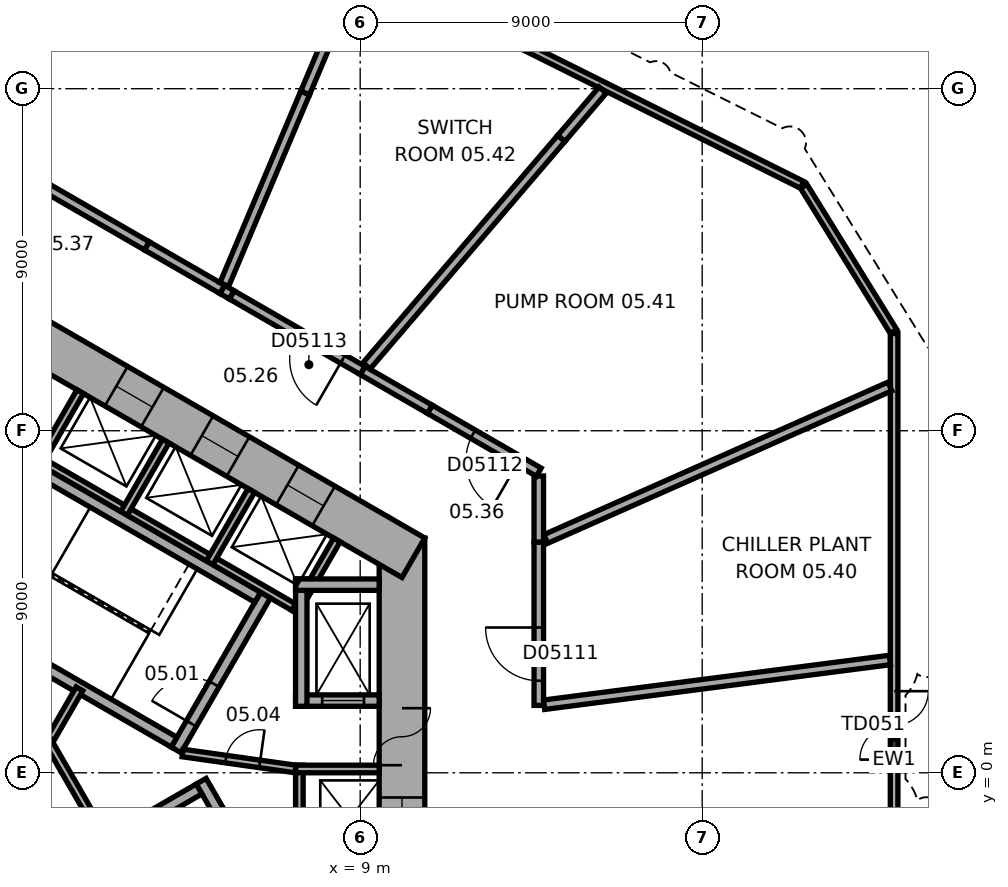
"""IFC4 building model, lengths in metres.
Left out: names, types, materials, properties, quantities, classifications, styles, units other than length and angle.
Written with IfcOpenShell. Run it as: python <this file> out.ifc"""

import sys

from ifc_helpers import new_model, si_unit, direction, frame, frame_2d, origin, place, context, subcontext, project, spatial, rectangle, extrude, element, fill, save


model = new_model("IFC4")
c1 = context("Model", 3, precision=1e-05, world=origin(), true_north=direction((0.0, 1.0)))
c2 = subcontext(c1, "Body", "Model", "MODEL_VIEW")
j1 = project(units=[si_unit("LENGTHUNIT", "METRE"), si_unit("PLANEANGLEUNIT", "RADIAN")], contexts=[c1])
p1 = place(None, origin())
s1 = spatial("IfcSite", under=j1, at=p1, CompositionType="ELEMENT")
p2 = place(p1, origin())
s2 = spatial("IfcBuilding", under=s1, at=p2, CompositionType="ELEMENT")
p3 = place(p2, frame((0.0, 0.0, 34.5)))
s3 = spatial("IfcBuildingStorey", under=s2, at=p3, CompositionType="ELEMENT", Elevation=34.5)
p4 = place(p3, frame((10.1, -6.177, 0.0), z_axis=(0.0, 0.0, 1.0), x_axis=(0.0, 1.0, 0.0)))
e1 = element("IfcWall", 1, at=p4, inside=s3, PredefinedType="SHEAR", context=c2, shape_type="SweptSolid", body=[
    extrude(rectangle(XDim=12.355, YDim=1.2, at=frame_2d((6.177, 0.0))), origin(), (0.0, 0.0, 1.0), 4.5),
])
p5 = place(p4, frame((6.378, 0.0, 0.0)))
e2 = element("IfcOpeningElement", 2, at=p5, cuts=e1, PredefinedType="OPENING", context=c2, shape_type="SweptSolid", body=[
    extrude(rectangle(XDim=1.5, YDim=2.1, at=frame_2d((0.75, 1.05))), frame((0.0, 0.61, 0.0), z_axis=(0.0, -1.0, 0.0), x_axis=(1.0, 0.0, 0.0)), (0.0, 0.0, 1.0), 1.22),
])
p6 = place(p4, frame((1.828, 0.0, 0.0)))
e3 = element("IfcOpeningElement", 3, at=p6, cuts=e1, PredefinedType="OPENING", context=c2, shape_type="SweptSolid", body=[
    extrude(rectangle(XDim=1.1, YDim=2.1, at=frame_2d((0.55, 1.05))), frame((0.0, 0.61, 0.0), z_axis=(0.0, -1.0, 0.0), x_axis=(1.0, 0.0, 0.0)), (0.0, 0.0, 1.0), 1.22),
])
p7 = place(p4, frame((4.427, 0.0, 0.0)))
e4 = element("IfcOpeningElement", 4, at=p7, cuts=e1, PredefinedType="OPENING", context=c2, shape_type="SweptSolid", body=[
    extrude(rectangle(XDim=1.1, YDim=2.1, at=frame_2d((0.55, 1.05))), frame((0.0, 0.61, 0.0), z_axis=(0.0, -1.0, 0.0), x_axis=(1.0, 0.0, 0.0)), (0.0, 0.0, 1.0), 1.22),
])
p8 = place(p3, frame((10.4, 5.658, 0.0), z_axis=(0.0, 0.0, 1.0), x_axis=(-0.866021384402, 0.500006961711, 0.0)))
e5 = element("IfcWall", 5, at=p8, inside=s3, PredefinedType="SHEAR", context=c2, shape_type="SweptSolid", body=[
    extrude(rectangle(XDim=12.355, YDim=1.2, at=frame_2d((6.178, 0.0))), origin(), (0.0, 0.0, 1.0), 4.5),
])
p9 = place(p8, frame((2.728, 0.0, 0.0)))
e6 = element("IfcOpeningElement", 6, at=p9, cuts=e5, PredefinedType="OPENING", context=c2, shape_type="SweptSolid", body=[
    extrude(rectangle(XDim=1.1, YDim=2.1, at=frame_2d((0.55, 1.05))), frame((0.0, 0.61, 0.0), z_axis=(0.0, -1.0, 0.0), x_axis=(1.0, 0.0, 0.0)), (0.0, 0.0, 1.0), 1.22),
])
p10 = place(p8, frame((5.328, 0.0, 0.0)))
e7 = element("IfcOpeningElement", 7, at=p10, cuts=e5, PredefinedType="OPENING", context=c2, shape_type="SweptSolid", body=[
    extrude(rectangle(XDim=1.1, YDim=2.1, at=frame_2d((0.55, 1.05))), frame((0.0, 0.61, 0.0), z_axis=(0.0, -1.0, 0.0), x_axis=(1.0, 0.0, 0.0)), (0.0, 0.0, 1.0), 1.22),
])
p11 = place(p8, frame((7.928, 0.0, 0.0)))
e8 = element("IfcOpeningElement", 8, at=p11, cuts=e5, PredefinedType="OPENING", context=c2, shape_type="SweptSolid", body=[
    extrude(rectangle(XDim=1.1, YDim=2.1, at=frame_2d((0.55, 1.05))), frame((0.0, 0.61, 0.0), z_axis=(0.0, -1.0, 0.0), x_axis=(1.0, 0.0, 0.0)), (0.0, 0.0, 1.0), 1.22),
])
p12 = place(p3, frame((23.05, -9.687, 0.0), z_axis=(0.0, 0.0, 1.0), x_axis=(0.0, 1.0, 0.0)))
e9 = element("IfcWall", 9, at=p12, inside=s3, PredefinedType="STANDARD", context=c2, shape_type="SweptSolid", body=[
    extrude(rectangle(XDim=21.246, YDim=0.2, at=frame_2d((10.623, 0.0))), origin(), (0.0, 0.0, 1.0), 4.5),
])
p13 = place(p12, frame((10.034, 0.0, 0.0)))
e10 = element("IfcOpeningElement", 10, at=p13, cuts=e9, PredefinedType="OPENING", context=c2, shape_type="SweptSolid", body=[
    extrude(rectangle(XDim=1.8, YDim=2.4, at=frame_2d((0.9, 1.2))), frame((0.0, 0.11, 0.0), z_axis=(0.0, -1.0, 0.0), x_axis=(1.0, 0.0, 0.0)), (0.0, 0.0, 1.0), 0.22),
])
p14 = place(p3, frame((23.035, 11.612, 0.0), z_axis=(0.0, 0.0, 1.0), x_axis=(-0.526160091227, 0.850385535155, 0.0)))
e11 = element("IfcWall", 11, at=p14, inside=s3, PredefinedType="STANDARD", context=c2, shape_type="SweptSolid", body=[
    extrude(rectangle(XDim=4.494, YDim=0.2, at=frame_2d((2.247, 0.0))), origin(), (0.0, 0.0, 1.0), 4.5),
])
p15 = place(p3, frame((20.63, 15.47, 0.0), z_axis=(0.0, 0.0, 1.0), x_axis=(-0.894934518609, 0.446197498203, 0.0)))
e12 = element("IfcWall", 12, at=p15, inside=s3, PredefinedType="STANDARD", context=c2, shape_type="SweptSolid", body=[
    extrude(rectangle(XDim=21.246, YDim=0.2, at=frame_2d((10.623, 0.0))), origin(), (0.0, 0.0, 1.0), 4.5),
])
p16 = place(p3, frame((7.4, -5.2, 0.0), z_axis=(0.0, 0.0, 1.0), x_axis=(0.0, 1.0, 0.0)))
e13 = element("IfcWall", 13, at=p16, inside=s3, PredefinedType="PARTITIONING", context=c2, shape_type="SweptSolid", body=[
    extrude(rectangle(XDim=5.4, YDim=0.2, at=frame_2d((2.7, 0.0))), origin(), (0.0, 0.0, 1.0), 4.2),
])
p17 = place(p3, frame((7.3, 0.1, 0.0), z_axis=(0.0, 0.0, 1.0), x_axis=(1.0, 0.0, 0.0)))
e14 = element("IfcWall", 14, at=p17, inside=s3, PredefinedType="PARTITIONING", context=c2, shape_type="SweptSolid", body=[
    extrude(rectangle(XDim=2.2, YDim=0.2, at=frame_2d((1.1, 0.0))), origin(), (0.0, 0.0, 1.0), 4.2),
])
p18 = place(p3, frame((7.424, 4.259, 0.0), z_axis=(0.0, 0.0, 1.0), x_axis=(-0.866026010844, 0.49999894854, 0.0)))
e15 = element("IfcWall", 15, at=p18, inside=s3, PredefinedType="PARTITIONING", context=c2, shape_type="SweptSolid", body=[
    extrude(rectangle(XDim=8.0, YDim=0.2, at=frame_2d((4.0, 0.0))), origin(), (0.0, 0.0, 1.0), 4.2),
])
for number, where, z_axis, x_axis in (
    (16, (7.287, 4.222, 0.0), (0.0, 0.0, 1.0), (0.5, 0.866, 0.0)),
    (17, (5.036, 5.522, 0.0), (0.0, 0.0, 1.0), (0.5, 0.866, 0.0)),
    (18, (2.784, 6.822, 0.0), (0.0, 0.0, 1.0), (0.5, 0.866, 0.0)),
    (19, (0.532, 8.122, 0.0), (0.0, 0.0, 1.0), (0.5, 0.866, 0.0)),
):
    element("IfcWall", number, at=place(p3, frame(where, z_axis=z_axis, x_axis=x_axis)), inside=s3, PredefinedType="PARTITIONING", context=c2, shape_type="SweptSolid", body=[
        extrude(rectangle(XDim=2.2, YDim=0.2, at=frame_2d((1.1, 0.0))), origin(), (0.0, 0.0, 1.0), 4.2),
    ])
p19 = place(p3, frame((4.158, 0.602, 0.0), z_axis=(0.0, 0.0, 1.0), x_axis=(0.499977259774, 0.866038532462, 0.0)))
e20 = element("IfcWall", 20, at=p19, inside=s3, PredefinedType="SHEAR", context=c2, shape_type="SweptSolid", body=[
    extrude(rectangle(XDim=4.7, YDim=0.3, at=frame_2d((2.35, 0.0))), origin(), (0.0, 0.0, 1.0), 4.2),
])
p20 = place(p19, frame((0.8, 0.0, 0.0)))
e21 = element("IfcOpeningElement", 21, at=p20, cuts=e20, PredefinedType="OPENING", context=c2, shape_type="SweptSolid", body=[
    extrude(rectangle(XDim=1.2, YDim=2.1, at=frame_2d((0.6, 1.05))), frame((0.0, 0.16, 0.0), z_axis=(0.0, -1.0, 0.0), x_axis=(1.0, 0.0, 0.0)), (0.0, 0.0, 1.0), 0.32),
])
for number, where, z_axis, x_axis in (
    (22, (4.103, 0.807, 0.0), (0.0, 0.0, 1.0), (-0.866, 0.5, 0.0)),
    (23, (6.303, 4.617, 0.0), (0.0, 0.0, 1.0), (-0.866, 0.5, 0.0)),
):
    element("IfcWall", number, at=place(p3, frame(where, z_axis=z_axis, x_axis=x_axis)), inside=s3, PredefinedType="SHEAR", context=c2, shape_type="SweptSolid", body=[
        extrude(rectangle(XDim=7.06, YDim=0.3, at=frame_2d((3.53, 0.0))), origin(), (0.0, 0.0, 1.0), 4.2),
    ])
p21 = place(p3, frame((4.816, -0.222, 0.0), z_axis=(0.0, 0.0, 1.0), x_axis=(0.499977259774, -0.866038532462, 0.0)))
e24 = element("IfcWall", 24, at=p21, inside=s3, PredefinedType="SHEAR", context=c2, shape_type="SweptSolid", body=[
    extrude(rectangle(XDim=4.7, YDim=0.3, at=frame_2d((2.35, 0.0))), origin(), (0.0, 0.0, 1.0), 4.2),
])
p22 = place(p3, frame((-1.353, -3.957, 0.0), z_axis=(0.0, 0.0, 1.0), x_axis=(0.866027801685, 0.499995846692, 0.0)))
e25 = element("IfcWall", 25, at=p22, inside=s3, PredefinedType="SHEAR", context=c2, shape_type="SweptSolid", body=[
    extrude(rectangle(XDim=7.06, YDim=0.3, at=frame_2d((3.53, 0.0))), origin(), (0.0, 0.0, 1.0), 4.2),
])
p23 = place(p3, frame((7.3, 1.9, 0.0), z_axis=(0.0, 0.0, 1.0), x_axis=(1.0, 0.0, 0.0)))
e26 = element("IfcWall", 26, at=p23, inside=s3, PredefinedType="SHEAR", context=c2, shape_type="SweptSolid", body=[
    extrude(rectangle(XDim=2.2, YDim=0.3, at=frame_2d((1.1, 0.0))), origin(), (0.0, 0.0, 1.0), 4.2),
])
p24 = place(p23, frame((0.7, 0.0, 0.0)))
e27 = element("IfcOpeningElement", 27, at=p24, cuts=e26, PredefinedType="OPENING", context=c2, shape_type="SweptSolid", body=[
    extrude(rectangle(XDim=1.1, YDim=2.1, at=frame_2d((0.55, 1.05))), frame((0.0, 0.16, 0.0), z_axis=(0.0, -1.0, 0.0), x_axis=(1.0, 0.0, 0.0)), (0.0, 0.0, 1.0), 0.32),
])
p25 = place(p3, frame((7.45, 1.75, 0.0), z_axis=(0.0, 0.0, 1.0), x_axis=(0.0, 1.0, 0.0)))
e28 = element("IfcWall", 28, at=p25, inside=s3, PredefinedType="SHEAR", context=c2, shape_type="SweptSolid", body=[
    extrude(rectangle(XDim=3.35, YDim=0.3, at=frame_2d((1.675, 0.0))), origin(), (0.0, 0.0, 1.0), 4.2),
])
p26 = place(p3, frame((7.3, 4.95, 0.0), z_axis=(0.0, 0.0, 1.0), x_axis=(1.0, 0.0, 0.0)))
e29 = element("IfcWall", 29, at=p26, inside=s3, PredefinedType="SHEAR", context=c2, shape_type="SweptSolid", body=[
    extrude(rectangle(XDim=2.2, YDim=0.3, at=frame_2d((1.1, 0.0))), origin(), (0.0, 0.0, 1.0), 4.2),
])
p27 = place(p3, frame((4.327, 0.521, 0.0), z_axis=(0.0, 0.0, 1.0), x_axis=(0.990124376366, -0.14019172346, 0.0)))
e30 = element("IfcWall", 30, at=p27, inside=s3, PredefinedType="PARTITIONING", context=c2, shape_type="SweptSolid", body=[
    extrude(rectangle(XDim=3.002, YDim=0.2, at=frame_2d((1.501, 0.0))), origin(), (0.0, 0.0, 1.0), 4.2),
])
p28 = place(p27, frame((1.15, 0.0, 0.0)))
e31 = element("IfcOpeningElement", 31, at=p28, cuts=e30, PredefinedType="OPENING", context=c2, shape_type="SweptSolid", body=[
    extrude(rectangle(XDim=0.9, YDim=2.1, at=frame_2d((0.45, 1.05))), frame((0.0, 0.11, 0.0), z_axis=(0.0, -1.0, 0.0), x_axis=(1.0, 0.0, 0.0)), (0.0, 0.0, 1.0), 0.22),
])
p29 = place(p3, frame((0.92, 0.8, 0.0), z_axis=(0.0, 0.0, 1.0), x_axis=(-1.0, 0.0, 0.0)))
e32 = element("IfcWall", 32, at=p29, inside=s3, PredefinedType="PARTITIONING", context=c2, shape_type="SweptSolid", body=[
    extrude(rectangle(XDim=3.64, YDim=0.2, at=frame_2d((1.82, 0.0))), origin(), (0.0, 0.0, 1.0), 4.2),
])
p30 = place(p3, frame((0.74, 0.696, 0.0), z_axis=(0.0, 0.0, 1.0), x_axis=(0.499956301907, 0.86605063142, 0.0)))
e33 = element("IfcWall", 33, at=p30, inside=s3, PredefinedType="PARTITIONING", context=c2, shape_type="SweptSolid", body=[
    extrude(rectangle(XDim=1.747, YDim=0.2, at=frame_2d((0.874, 0.0))), origin(), (0.0, 0.0, 1.0), 4.2),
])
p31 = place(p3, frame((0.74, 0.904, 0.0), z_axis=(0.0, 0.0, 1.0), x_axis=(0.500028278809, -0.866009076391, 0.0)))
e34 = element("IfcWall", 34, at=p31, inside=s3, PredefinedType="PARTITIONING", context=c2, shape_type="SweptSolid", body=[
    extrude(rectangle(XDim=3.133, YDim=0.2, at=frame_2d((1.566, 0.0))), origin(), (0.0, 0.0, 1.0), 4.2),
])
p32 = place(p3, frame((13.839, 1.791, 0.0), z_axis=(0.0, 0.0, 1.0), x_axis=(0.991734131904, 0.128309826658, 0.0)))
e35 = element("IfcWall", 35, at=p32, inside=s3, PredefinedType="SOLIDWALL", context=c2, shape_type="SweptSolid", body=[
    extrude(rectangle(XDim=9.177, YDim=0.25, at=frame_2d((4.588, 0.0))), origin(), (0.0, 0.0, 1.0), 4.2),
])
p33 = place(p3, frame((13.7, 6.071, 0.0), z_axis=(0.0, 0.0, 1.0), x_axis=(0.0, -1.0, 0.0)))
e36 = element("IfcWall", 36, at=p33, inside=s3, PredefinedType="SOLIDWALL", context=c2, shape_type="SweptSolid", body=[
    extrude(rectangle(XDim=4.298, YDim=0.25, at=frame_2d((2.149, 0.0))), origin(), (0.0, 0.0, 1.0), 4.2),
])
p34 = place(p33, frame((2.248, 0.0, 0.0)))
e37 = element("IfcOpeningElement", 37, at=p34, cuts=e36, PredefinedType="OPENING", context=c2, shape_type="SweptSolid", body=[
    extrude(rectangle(XDim=1.4, YDim=2.1, at=frame_2d((0.7, 1.05))), frame((0.0, 0.135, 0.0), z_axis=(0.0, -1.0, 0.0), x_axis=(1.0, 0.0, 0.0)), (0.0, 0.0, 1.0), 0.27),
])
p35 = place(p3, frame((13.883, 6.152, 0.0), z_axis=(0.0, 0.0, 1.0), x_axis=(0.914277420945, 0.405088629254, 0.0)))
e38 = element("IfcWall", 38, at=p35, inside=s3, PredefinedType="SOLIDWALL", context=c2, shape_type="SweptSolid", body=[
    extrude(rectangle(XDim=9.906, YDim=0.25, at=frame_2d((4.953, 0.0))), origin(), (0.0, 0.0, 1.0), 4.2),
])
p36 = place(p3, frame((13.7, 7.81, 0.0), z_axis=(0.0, 0.0, 1.0), x_axis=(0.0, -1.0, 0.0)))
e39 = element("IfcWall", 39, at=p36, inside=s3, PredefinedType="SOLIDWALL", context=c2, shape_type="SweptSolid", body=[
    extrude(rectangle(XDim=1.739, YDim=0.25, at=frame_2d((0.87, 0.0))), origin(), (0.0, 0.0, 1.0), 4.2),
])
p37 = place(p3, frame((13.7, 7.909, 0.0), z_axis=(0.0, 0.0, 1.0), x_axis=(-0.866014848099, 0.500018282537, 0.0)))
e40 = element("IfcWall", 40, at=p37, inside=s3, PredefinedType="SOLIDWALL", context=c2, shape_type="SweptSolid", body=[
    extrude(rectangle(XDim=3.31, YDim=0.25, at=frame_2d((1.655, 0.0))), origin(), (0.0, 0.0, 1.0), 4.2),
])
p38 = place(p37, frame((0.6, 0.0, 0.0)))
e41 = element("IfcOpeningElement", 41, at=p38, cuts=e40, PredefinedType="OPENING", context=c2, shape_type="SweptSolid", body=[
    extrude(rectangle(XDim=1.4, YDim=2.1, at=frame_2d((0.7, 1.05))), frame((0.0, 0.135, 0.0), z_axis=(0.0, -1.0, 0.0), x_axis=(1.0, 0.0, 0.0)), (0.0, 0.0, 1.0), 0.27),
])
p39 = place(p3, frame((10.833, 9.564, 0.0), z_axis=(0.0, 0.0, 1.0), x_axis=(-0.866058244174, 0.499943114462, 0.0)))
e42 = element("IfcWall", 42, at=p39, inside=s3, PredefinedType="SOLIDWALL", context=c2, shape_type="SweptSolid", body=[
    extrude(rectangle(XDim=2.043, YDim=0.25, at=frame_2d((1.021, 0.0))), origin(), (0.0, 0.0, 1.0), 4.2),
])
p40 = place(p3, frame((9.064, 10.586, 0.0), z_axis=(0.0, 0.0, 1.0), x_axis=(-0.865998553266, 0.500046503579, 0.0)))
e43 = element("IfcWall", 43, at=p40, inside=s3, PredefinedType="SOLIDWALL", context=c2, shape_type="SweptSolid", body=[
    extrude(rectangle(XDim=3.978, YDim=0.25, at=frame_2d((1.989, 0.0))), origin(), (0.0, 0.0, 1.0), 4.2),
])
p41 = place(p40, frame((0.6, 0.0, 0.0)))
e44 = element("IfcOpeningElement", 44, at=p41, cuts=e43, PredefinedType="OPENING", context=c2, shape_type="SweptSolid", body=[
    extrude(rectangle(XDim=1.4, YDim=2.1, at=frame_2d((0.7, 1.05))), frame((0.0, 0.135, 0.0), z_axis=(0.0, -1.0, 0.0), x_axis=(1.0, 0.0, 0.0)), (0.0, 0.0, 1.0), 0.27),
])
p42 = place(p3, frame((5.619, 12.575, 0.0), z_axis=(0.0, 0.0, 1.0), x_axis=(-0.865775094499, 0.500433297998, 0.0)))
e45 = element("IfcWall", 45, at=p42, inside=s3, PredefinedType="SOLIDWALL", context=c2, shape_type="SweptSolid", body=[
    extrude(rectangle(XDim=0.287, YDim=0.25, at=frame_2d((0.144, 0.0))), origin(), (0.0, 0.0, 1.0), 4.2),
])
p43 = place(p3, frame((3.386, 13.865, 0.0), z_axis=(0.0, 0.0, 1.0), x_axis=(0.866031201001, -0.499989958791, 0.0)))
e46 = element("IfcWall", 46, at=p43, inside=s3, PredefinedType="SOLIDWALL", context=c2, shape_type="SweptSolid", body=[
    extrude(rectangle(XDim=2.291, YDim=0.25, at=frame_2d((1.146, 0.0))), origin(), (0.0, 0.0, 1.0), 4.2),
])
p44 = place(p3, frame((0.087, 15.77, 0.0), z_axis=(0.0, 0.0, 1.0), x_axis=(0.866006299436, -0.500033088242, 0.0)))
e47 = element("IfcWall", 47, at=p44, inside=s3, PredefinedType="SOLIDWALL", context=c2, shape_type="SweptSolid", body=[
    extrude(rectangle(XDim=3.81, YDim=0.25, at=frame_2d((1.905, 0.0))), origin(), (0.0, 0.0, 1.0), 4.2),
])
p45 = place(p3, frame((14.293, 16.694, 0.0), z_axis=(0.0, 0.0, 1.0), x_axis=(-0.650375407049, -0.759612947432, 0.0)))
e48 = element("IfcWall", 48, at=p45, inside=s3, PredefinedType="SOLIDWALL", context=c2, shape_type="SweptSolid", body=[
    extrude(rectangle(XDim=7.88, YDim=0.25, at=frame_2d((3.94, 0.0))), origin(), (0.0, 0.0, 1.0), 4.2),
])
p46 = place(p3, frame((14.293, 16.694, 0.0), z_axis=(0.0, 0.0, 1.0), x_axis=(0.650490841035, 0.75951409844, 0.0)))
e49 = element("IfcWall", 49, at=p46, inside=s3, PredefinedType="SOLIDWALL", context=c2, shape_type="SweptSolid", body=[
    extrude(rectangle(XDim=1.673, YDim=0.25, at=frame_2d((0.836, 0.0))), origin(), (0.0, 0.0, 1.0), 4.2),
])
p47 = place(p3, frame((7.552, 17.889, 0.0), z_axis=(0.0, 0.0, 1.0), x_axis=(-0.38886264762, -0.921295740404, 0.0)))
e50 = element("IfcWall", 50, at=p47, inside=s3, PredefinedType="SOLIDWALL", context=c2, shape_type="SweptSolid", body=[
    extrude(rectangle(XDim=5.472, YDim=0.25, at=frame_2d((2.736, 0.0))), origin(), (0.0, 0.0, 1.0), 4.2),
])
p48 = place(p3, frame((7.552, 17.889, 0.0), z_axis=(0.0, 0.0, 1.0), x_axis=(0.388916536807, 0.921272992873, 0.0)))
e51 = element("IfcWall", 51, at=p48, inside=s3, PredefinedType="SOLIDWALL", context=c2, shape_type="SweptSolid", body=[
    extrude(rectangle(XDim=3.567, YDim=0.25, at=frame_2d((1.784, 0.0))), origin(), (0.0, 0.0, 1.0), 4.2),
])
p49 = place(p13, origin())
e52 = element("IfcDoor", 52, at=p49, inside=s3, OperationType="DOUBLE_DOOR_DOUBLE_SWING", PredefinedType="DOOR", context=c2, shape_type="SweptSolid", body=[
    extrude(rectangle(XDim=1.8, YDim=2.4, at=frame_2d((0.9, 1.2))), frame((0.0, 0.025, 0.0), z_axis=(0.0, -1.0, 0.0), x_axis=(1.0, 0.0, 0.0)), (0.0, 0.0, 1.0), 0.05),
])
fill(e10, e52)
p50 = place(p5, origin())
e53 = element("IfcDoor", 53, at=p50, inside=s3, OperationType="DOUBLE_DOOR_SINGLE_SWING", PredefinedType="DOOR", context=c2, shape_type="SweptSolid", body=[
    extrude(rectangle(XDim=1.5, YDim=2.1, at=frame_2d((0.75, 1.05))), frame((0.0, 0.025, 0.0), z_axis=(0.0, -1.0, 0.0), x_axis=(1.0, 0.0, 0.0)), (0.0, 0.0, 1.0), 0.05),
])
fill(e2, e53)
p51 = place(p20, origin())
e54 = element("IfcDoor", 54, at=p51, inside=s3, OperationType="SINGLE_SWING_RIGHT", PredefinedType="DOOR", context=c2, shape_type="SweptSolid", body=[
    extrude(rectangle(XDim=1.2, YDim=2.1, at=frame_2d((0.6, 1.05))), frame((0.0, 0.025, 0.0), z_axis=(0.0, -1.0, 0.0), x_axis=(1.0, 0.0, 0.0)), (0.0, 0.0, 1.0), 0.05),
])
fill(e21, e54)
p52 = place(p28, origin())
e55 = element("IfcDoor", 55, at=p52, inside=s3, OperationType="SINGLE_SWING_LEFT", PredefinedType="DOOR", context=c2, shape_type="SweptSolid", body=[
    extrude(rectangle(XDim=0.9, YDim=2.1, at=frame_2d((0.45, 1.05))), frame((0.0, 0.025, 0.0), z_axis=(0.0, -1.0, 0.0), x_axis=(1.0, 0.0, 0.0)), (0.0, 0.0, 1.0), 0.05),
])
fill(e31, e55)
p53 = place(p24, origin())
e56 = element("IfcDoor", 56, at=p53, inside=s3, OperationType="DOUBLE_DOOR_SLIDING", PredefinedType="DOOR", context=c2, shape_type="SweptSolid", body=[
    extrude(rectangle(XDim=1.1, YDim=2.1, at=frame_2d((0.55, 1.05))), frame((0.0, 0.025, 0.0), z_axis=(0.0, -1.0, 0.0), x_axis=(1.0, 0.0, 0.0)), (0.0, 0.0, 1.0), 0.05),
])
fill(e27, e56)
p54 = place(p7, origin())
e57 = element("IfcDoor", 57, at=p54, inside=s3, OperationType="DOUBLE_DOOR_SLIDING", PredefinedType="DOOR", context=c2, shape_type="SweptSolid", body=[
    extrude(rectangle(XDim=1.1, YDim=2.1, at=frame_2d((0.55, 1.05))), frame((0.0, 0.025, 0.0), z_axis=(0.0, -1.0, 0.0), x_axis=(1.0, 0.0, 0.0)), (0.0, 0.0, 1.0), 0.05),
])
fill(e4, e57)
p55 = place(p9, origin())
e58 = element("IfcDoor", 58, at=p55, inside=s3, OperationType="DOUBLE_DOOR_SLIDING", PredefinedType="DOOR", context=c2, shape_type="SweptSolid", body=[
    extrude(rectangle(XDim=1.1, YDim=2.1, at=frame_2d((0.55, 1.05))), frame((0.0, 0.025, 0.0), z_axis=(0.0, -1.0, 0.0), x_axis=(1.0, 0.0, 0.0)), (0.0, 0.0, 1.0), 0.05),
])
fill(e6, e58)
p56 = place(p10, origin())
e59 = element("IfcDoor", 59, at=p56, inside=s3, OperationType="DOUBLE_DOOR_SLIDING", PredefinedType="DOOR", context=c2, shape_type="SweptSolid", body=[
    extrude(rectangle(XDim=1.1, YDim=2.1, at=frame_2d((0.55, 1.05))), frame((0.0, 0.025, 0.0), z_axis=(0.0, -1.0, 0.0), x_axis=(1.0, 0.0, 0.0)), (0.0, 0.0, 1.0), 0.05),
])
fill(e7, e59)
p57 = place(p11, origin())
e60 = element("IfcDoor", 60, at=p57, inside=s3, OperationType="DOUBLE_DOOR_SLIDING", PredefinedType="DOOR", context=c2, shape_type="SweptSolid", body=[
    extrude(rectangle(XDim=1.1, YDim=2.1, at=frame_2d((0.55, 1.05))), frame((0.0, 0.025, 0.0), z_axis=(0.0, -1.0, 0.0), x_axis=(1.0, 0.0, 0.0)), (0.0, 0.0, 1.0), 0.05),
])
fill(e8, e60)
p58 = place(p34, origin())
e61 = element("IfcDoor", 61, at=p58, inside=s3, OperationType="SINGLE_SWING_LEFT", PredefinedType="DOOR", context=c2, shape_type="SweptSolid", body=[
    extrude(rectangle(XDim=1.4, YDim=2.1, at=frame_2d((0.7, 1.05))), frame((0.0, 0.025, 0.0), z_axis=(0.0, -1.0, 0.0), x_axis=(1.0, 0.0, 0.0)), (0.0, 0.0, 1.0), 0.05),
])
fill(e37, e61)
p59 = place(p38, origin())
e62 = element("IfcDoor", 62, at=p59, inside=s3, OperationType="SINGLE_SWING_LEFT", PredefinedType="DOOR", context=c2, shape_type="SweptSolid", body=[
    extrude(rectangle(XDim=1.4, YDim=2.1, at=frame_2d((0.7, 1.05))), frame((0.0, 0.025, 0.0), z_axis=(0.0, -1.0, 0.0), x_axis=(1.0, 0.0, 0.0)), (0.0, 0.0, 1.0), 0.05),
])
fill(e41, e62)
p60 = place(p41, origin())
e63 = element("IfcDoor", 63, at=p60, inside=s3, OperationType="SINGLE_SWING_LEFT", PredefinedType="DOOR", context=c2, shape_type="SweptSolid", body=[
    extrude(rectangle(XDim=1.4, YDim=2.1, at=frame_2d((0.7, 1.05))), frame((0.0, 0.025, 0.0), z_axis=(0.0, -1.0, 0.0), x_axis=(1.0, 0.0, 0.0)), (0.0, 0.0, 1.0), 0.05),
])
fill(e44, e63)
save(model, sys.argv[1])
